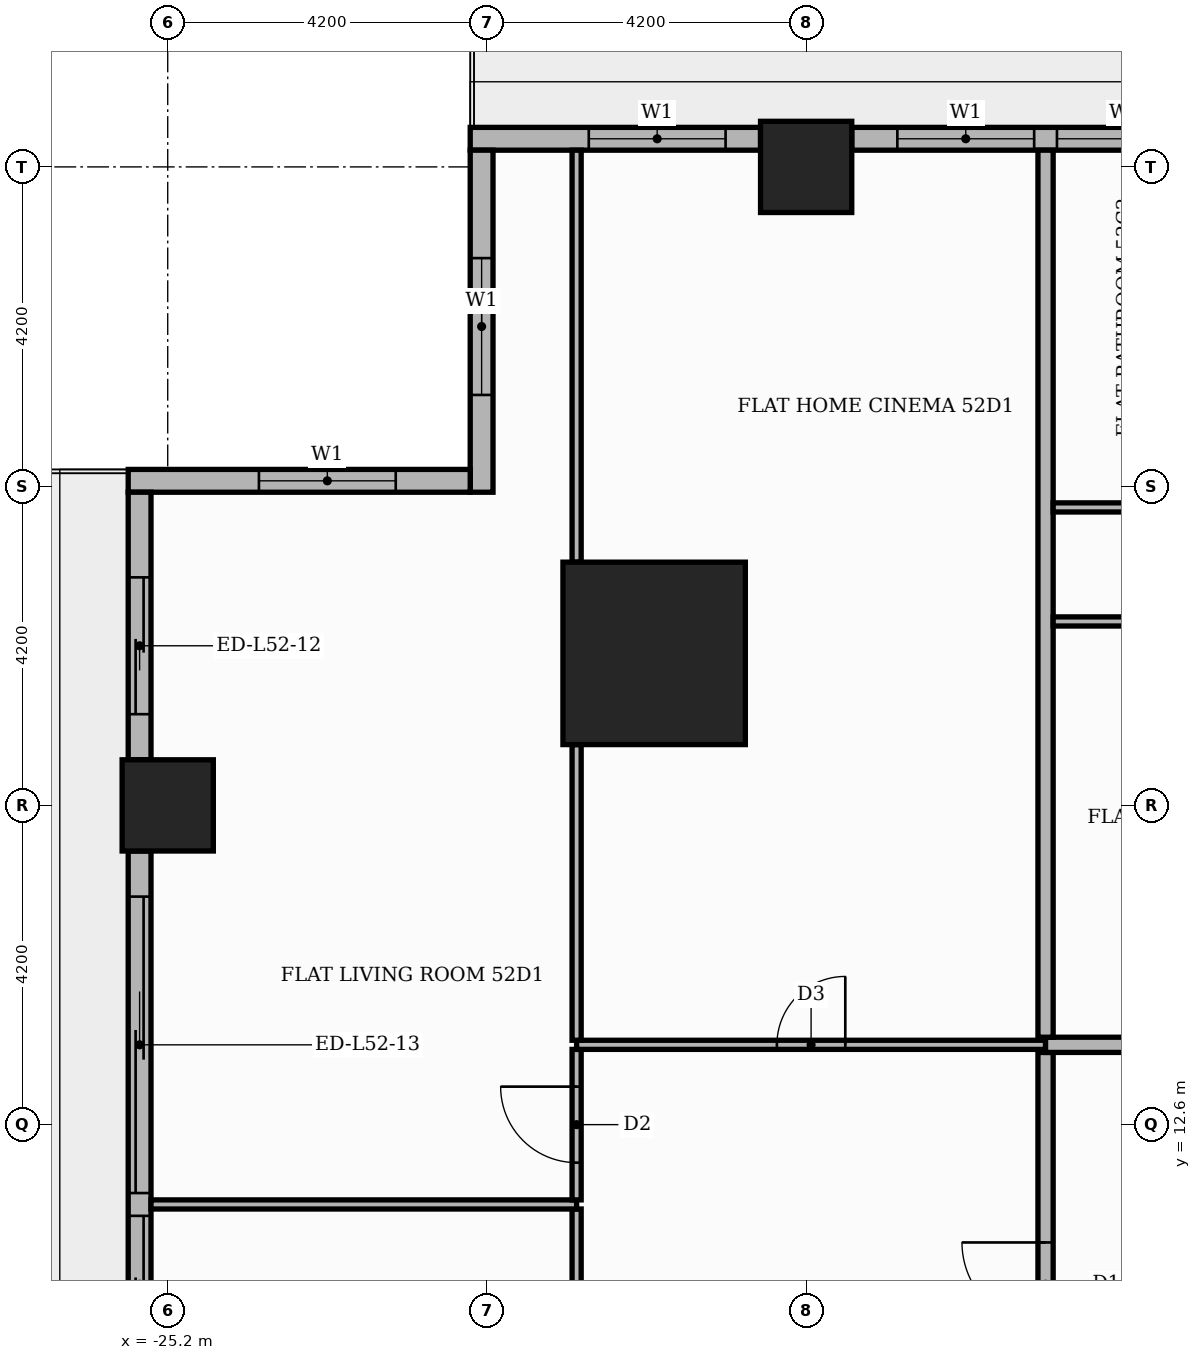
"""IFC4 building model, lengths in metres.
Left out: names, types, materials, properties, quantities, classifications, styles, units other than length and angle.
Written with IfcOpenShell. Run it as: python <this file> out.ifc"""

import sys

from ifc_helpers import new_model, si_unit, direction, frame, frame_2d, origin, origin_2d, place, context, subcontext, project, spatial, rectangle, extrude, element, fill, save


model = new_model("IFC4")
c1 = context("Model", 3, precision=1e-05, world=origin(), true_north=direction((0.0, 1.0)))
c2 = subcontext(c1, "Body", "Model", "MODEL_VIEW")
j1 = project(units=[si_unit("LENGTHUNIT", "METRE"), si_unit("PLANEANGLEUNIT", "RADIAN")], contexts=[c1])
p1 = place(None, origin())
s1 = spatial("IfcSite", under=j1, at=p1, CompositionType="ELEMENT")
p2 = place(p1, origin())
s2 = spatial("IfcBuilding", under=s1, at=p2, CompositionType="ELEMENT")
p3 = place(p2, frame((0.0, 0.0, 219.6)))
s3 = spatial("IfcBuildingStorey", under=s2, at=p3, CompositionType="ELEMENT", Elevation=219.6)
p4 = place(p3, frame((-18.8, 18.8, 0.0), z_axis=(0.0, 0.0, 1.0), x_axis=(1.0, 0.0, 0.0)))
e1 = element("IfcColumn", 1, at=p4, inside=s3, PredefinedType="COLUMN", context=c2, shape_type="SweptSolid", body=[
    extrude(rectangle(XDim=2.4, YDim=2.4, at=origin_2d()), origin(), (0.0, 0.0, 1.0), 3.9),
])
for number, where, z_axis, x_axis in (
    (2, (-16.8, 25.2, 0.0), (0.0, 0.0, 1.0), (1.0, 0.0, 0.0)),
    (3, (-25.2, 16.8, 0.0), (0.0, 0.0, 1.0), (1.0, 0.0, 0.0)),
):
    element("IfcColumn", number, at=place(p3, frame(where, z_axis=z_axis, x_axis=x_axis)), inside=s3, PredefinedType="COLUMN", context=c2, shape_type="SweptSolid", body=[
        extrude(rectangle(XDim=1.2, YDim=1.2, at=origin_2d()), origin(), (0.0, 0.0, 1.0), 3.9),
    ])
p5 = place(p3, frame((-9.0, 25.57, 0.0), z_axis=(0.0, 0.0, 1.0), x_axis=(-1.0, 0.0, 0.0)))
e4 = element("IfcWall", 4, at=p5, inside=s3, PredefinedType="STANDARD", context=c2, shape_type="SweptSolid", body=[
    extrude(rectangle(XDim=7.2, YDim=0.3, at=frame_2d((3.6, 0.0))), origin(), (0.0, 0.0, 1.0), 3.48),
])
p6 = place(p5, frame((0.6, 0.0, 0.9)))
e5 = element("IfcOpeningElement", 5, at=p6, cuts=e4, PredefinedType="OPENING", context=c2, shape_type="SweptSolid", body=[
    extrude(rectangle(XDim=1.8, YDim=2.1, at=frame_2d((0.9, 1.05))), frame((0.0, 0.16, 0.0), z_axis=(0.0, -1.0, 0.0), x_axis=(1.0, 0.0, 0.0)), (0.0, 0.0, 1.0), 0.32),
])
p7 = place(p5, frame((2.7, 0.0, 0.9)))
e6 = element("IfcOpeningElement", 6, at=p7, cuts=e4, PredefinedType="OPENING", context=c2, shape_type="SweptSolid", body=[
    extrude(rectangle(XDim=1.8, YDim=2.1, at=frame_2d((0.9, 1.05))), frame((0.0, 0.16, 0.0), z_axis=(0.0, -1.0, 0.0), x_axis=(1.0, 0.0, 0.0)), (0.0, 0.0, 1.0), 0.32),
])
p8 = place(p5, frame((4.8, 0.0, 0.9)))
e7 = element("IfcOpeningElement", 7, at=p8, cuts=e4, PredefinedType="OPENING", context=c2, shape_type="SweptSolid", body=[
    extrude(rectangle(XDim=1.8, YDim=2.1, at=frame_2d((0.9, 1.05))), frame((0.0, 0.16, 0.0), z_axis=(0.0, -1.0, 0.0), x_axis=(1.0, 0.0, 0.0)), (0.0, 0.0, 1.0), 0.32),
])
p9 = place(p3, frame((-17.4, 25.57, 0.0), z_axis=(0.0, 0.0, 1.0), x_axis=(-1.0, 0.0, 0.0)))
e8 = element("IfcWall", 8, at=p9, inside=s3, PredefinedType="STANDARD", context=c2, shape_type="SweptSolid", body=[
    extrude(rectangle(XDim=3.82, YDim=0.3, at=frame_2d((1.91, 0.0))), origin(), (0.0, 0.0, 1.0), 3.48),
])
p10 = place(p9, frame((0.46, 0.0, 0.9)))
e9 = element("IfcOpeningElement", 9, at=p10, cuts=e8, PredefinedType="OPENING", context=c2, shape_type="SweptSolid", body=[
    extrude(rectangle(XDim=1.8, YDim=2.1, at=frame_2d((0.9, 1.05))), frame((0.0, 0.16, 0.0), z_axis=(0.0, -1.0, 0.0), x_axis=(1.0, 0.0, 0.0)), (0.0, 0.0, 1.0), 0.32),
])
p11 = place(p3, frame((-21.07, 25.42, 0.0), z_axis=(0.0, 0.0, 1.0), x_axis=(0.0, -1.0, 0.0)))
e10 = element("IfcWall", 10, at=p11, inside=s3, PredefinedType="STANDARD", context=c2, shape_type="SweptSolid", body=[
    extrude(rectangle(XDim=4.5, YDim=0.3, at=frame_2d((2.25, 0.0))), origin(), (0.0, 0.0, 1.0), 3.48),
])
p12 = place(p11, frame((1.42, 0.0, 0.9)))
e11 = element("IfcOpeningElement", 11, at=p12, cuts=e10, PredefinedType="OPENING", context=c2, shape_type="SweptSolid", body=[
    extrude(rectangle(XDim=1.8, YDim=2.1, at=frame_2d((0.9, 1.05))), frame((0.0, 0.16, 0.0), z_axis=(0.0, -1.0, 0.0), x_axis=(1.0, 0.0, 0.0)), (0.0, 0.0, 1.0), 0.32),
])
p13 = place(p3, frame((-21.22, 21.07, 0.0), z_axis=(0.0, 0.0, 1.0), x_axis=(-1.0, 0.0, 0.0)))
e12 = element("IfcWall", 12, at=p13, inside=s3, PredefinedType="STANDARD", context=c2, shape_type="SweptSolid", body=[
    extrude(rectangle(XDim=4.5, YDim=0.3, at=frame_2d((2.25, 0.0))), origin(), (0.0, 0.0, 1.0), 3.48),
])
p14 = place(p13, frame((0.98, 0.0, 0.9)))
e13 = element("IfcOpeningElement", 13, at=p14, cuts=e12, PredefinedType="OPENING", context=c2, shape_type="SweptSolid", body=[
    extrude(rectangle(XDim=1.8, YDim=2.1, at=frame_2d((0.9, 1.05))), frame((0.0, 0.16, 0.0), z_axis=(0.0, -1.0, 0.0), x_axis=(1.0, 0.0, 0.0)), (0.0, 0.0, 1.0), 0.32),
])
p15 = place(p3, frame((-25.57, 20.92, 0.0), z_axis=(0.0, 0.0, 1.0), x_axis=(0.0, -1.0, 0.0)))
e14 = element("IfcWall", 14, at=p15, inside=s3, PredefinedType="STANDARD", context=c2, shape_type="SweptSolid", body=[
    extrude(rectangle(XDim=3.52, YDim=0.3, at=frame_2d((1.76, 0.0))), origin(), (0.0, 0.0, 1.0), 3.48),
])
p16 = place(p15, frame((1.12, 0.0, 0.0)))
e15 = element("IfcOpeningElement", 15, at=p16, cuts=e14, PredefinedType="OPENING", context=c2, shape_type="SweptSolid", body=[
    extrude(rectangle(XDim=1.8, YDim=2.4, at=frame_2d((0.9, 1.2))), frame((0.0, 0.16, 0.0), z_axis=(0.0, -1.0, 0.0), x_axis=(1.0, 0.0, 0.0)), (0.0, 0.0, 1.0), 0.32),
])
p17 = place(p3, frame((-25.57, 16.2, 0.0), z_axis=(0.0, 0.0, 1.0), x_axis=(0.0, -1.0, 0.0)))
e16 = element("IfcWall", 16, at=p17, inside=s3, PredefinedType="STANDARD", context=c2, shape_type="SweptSolid", body=[
    extrude(rectangle(XDim=7.2, YDim=0.3, at=frame_2d((3.6, 0.0))), origin(), (0.0, 0.0, 1.0), 3.48),
])
p18 = place(p17, frame((0.6, 0.0, 0.0)))
e17 = element("IfcOpeningElement", 17, at=p18, cuts=e16, PredefinedType="OPENING", context=c2, shape_type="SweptSolid", body=[
    extrude(rectangle(XDim=3.9, YDim=2.4, at=frame_2d((1.95, 1.2))), frame((0.0, 0.16, 0.0), z_axis=(0.0, -1.0, 0.0), x_axis=(1.0, 0.0, 0.0)), (0.0, 0.0, 1.0), 0.32),
])
p19 = place(p17, frame((4.8, 0.0, 0.0)))
e18 = element("IfcOpeningElement", 18, at=p19, cuts=e16, PredefinedType="OPENING", context=c2, shape_type="SweptSolid", body=[
    extrude(rectangle(XDim=1.8, YDim=2.4, at=frame_2d((0.9, 1.2))), frame((0.0, 0.16, 0.0), z_axis=(0.0, -1.0, 0.0), x_axis=(1.0, 0.0, 0.0)), (0.0, 0.0, 1.0), 0.32),
])
p20 = place(p3, frame((-13.65, -13.55, 0.0), z_axis=(0.0, 0.0, 1.0), x_axis=(0.0, 1.0, 0.0)))
e19 = element("IfcWall", 19, at=p20, inside=s3, PredefinedType="PARTITIONING", context=c2, shape_type="SweptSolid", body=[
    extrude(rectangle(XDim=27.1, YDim=0.2, at=frame_2d((13.55, 0.0))), origin(), (0.0, 0.0, 1.0), 3.48),
])
p21 = place(p20, frame((23.5, 0.0, 0.0)))
e20 = element("IfcOpeningElement", 20, at=p21, cuts=e19, PredefinedType="OPENING", context=c2, shape_type="SweptSolid", body=[
    extrude(rectangle(XDim=1.1, YDim=2.4, at=frame_2d((0.55, 1.2))), frame((0.0, 0.11, 0.0), z_axis=(0.0, -1.0, 0.0), x_axis=(1.0, 0.0, 0.0)), (0.0, 0.0, 1.0), 0.22),
])
p22 = place(p3, frame((-19.82, 5.31, 0.0), z_axis=(0.0, 0.0, 1.0), x_axis=(0.0, 1.0, 0.0)))
e21 = element("IfcWall", 21, at=p22, inside=s3, PredefinedType="PARTITIONING", context=c2, shape_type="SweptSolid", body=[
    extrude(rectangle(XDim=6.18, YDim=0.12, at=frame_2d((3.09, 0.0))), origin(), (0.0, 0.0, 1.0), 3.48),
])
p23 = place(p22, frame((2.64, 0.0, 0.0)))
e22 = element("IfcOpeningElement", 22, at=p23, cuts=e21, PredefinedType="OPENING", context=c2, shape_type="SweptSolid", body=[
    extrude(rectangle(XDim=0.9, YDim=2.1, at=frame_2d((0.45, 1.05))), frame((0.0, 0.07, 0.0), z_axis=(0.0, -1.0, 0.0), x_axis=(1.0, 0.0, 0.0)), (0.0, 0.0, 1.0), 0.14),
])
p24 = place(p3, frame((-25.42, 11.55, 0.0), z_axis=(0.0, 0.0, 1.0), x_axis=(1.0, 0.0, 0.0)))
e23 = element("IfcWall", 23, at=p24, inside=s3, PredefinedType="PARTITIONING", context=c2, shape_type="SweptSolid", body=[
    extrude(rectangle(XDim=5.6, YDim=0.12, at=frame_2d((2.8, 0.0))), origin(), (0.0, 0.0, 1.0), 3.48),
])
p25 = place(p3, frame((-19.82, 11.61, 0.0), z_axis=(0.0, 0.0, 1.0), x_axis=(0.0, 1.0, 0.0)))
e24 = element("IfcWall", 24, at=p25, inside=s3, PredefinedType="PARTITIONING", context=c2, shape_type="SweptSolid", body=[
    extrude(rectangle(XDim=1.98, YDim=0.12, at=frame_2d((0.99, 0.0))), origin(), (0.0, 0.0, 1.0), 3.48),
])
p26 = place(p25, frame((0.49, 0.0, 0.0)))
e25 = element("IfcOpeningElement", 25, at=p26, cuts=e24, PredefinedType="OPENING", context=c2, shape_type="SweptSolid", body=[
    extrude(rectangle(XDim=1.0, YDim=2.1, at=frame_2d((0.5, 1.05))), frame((0.0, 0.07, 0.0), z_axis=(0.0, -1.0, 0.0), x_axis=(1.0, 0.0, 0.0)), (0.0, 0.0, 1.0), 0.14),
])
p27 = place(p3, frame((-19.82, 13.65, 0.0), z_axis=(0.0, 0.0, 1.0), x_axis=(1.0, 0.0, 0.0)))
e26 = element("IfcWall", 26, at=p27, inside=s3, PredefinedType="PARTITIONING", context=c2, shape_type="SweptSolid", body=[
    extrude(rectangle(XDim=6.17, YDim=0.12, at=frame_2d((3.085, 0.0))), origin(), (0.0, 0.0, 1.0), 3.48),
])
p28 = place(p27, frame((2.635, 0.0, 0.0)))
e27 = element("IfcOpeningElement", 27, at=p28, cuts=e26, PredefinedType="OPENING", context=c2, shape_type="SweptSolid", body=[
    extrude(rectangle(XDim=0.9, YDim=2.1, at=frame_2d((0.45, 1.05))), frame((0.0, 0.07, 0.0), z_axis=(0.0, -1.0, 0.0), x_axis=(1.0, 0.0, 0.0)), (0.0, 0.0, 1.0), 0.14),
])
p29 = place(p3, frame((-13.65, 13.65, 0.0), z_axis=(0.0, 0.0, 1.0), x_axis=(1.0, 0.0, 0.0)))
e28 = element("IfcWall", 28, at=p29, inside=s3, PredefinedType="PARTITIONING", context=c2, shape_type="SweptSolid", body=[
    extrude(rectangle(XDim=39.07, YDim=0.2, at=frame_2d((19.535, 0.0))), origin(), (0.0, 0.0, 1.0), 3.48),
])
p30 = place(p29, frame((24.65, 0.0, 0.0)))
e29 = element("IfcOpeningElement", 29, at=p30, cuts=e28, PredefinedType="OPENING", context=c2, shape_type="SweptSolid", body=[
    extrude(rectangle(XDim=1.1, YDim=2.4, at=frame_2d((0.55, 1.2))), frame((0.0, 0.11, 0.0), z_axis=(0.0, -1.0, 0.0), x_axis=(1.0, 0.0, 0.0)), (0.0, 0.0, 1.0), 0.22),
])
p31 = place(p29, frame((14.15, 0.0, 0.0)))
e30 = element("IfcOpeningElement", 30, at=p31, cuts=e28, PredefinedType="OPENING", context=c2, shape_type="SweptSolid", body=[
    extrude(rectangle(XDim=1.1, YDim=2.4, at=frame_2d((0.55, 1.2))), frame((0.0, 0.11, 0.0), z_axis=(0.0, -1.0, 0.0), x_axis=(1.0, 0.0, 0.0)), (0.0, 0.0, 1.0), 0.22),
])
p32 = place(p3, frame((-19.82, 13.71, 0.0), z_axis=(0.0, 0.0, 1.0), x_axis=(0.0, 1.0, 0.0)))
e31 = element("IfcWall", 31, at=p32, inside=s3, PredefinedType="PARTITIONING", context=c2, shape_type="SweptSolid", body=[
    extrude(rectangle(XDim=3.89, YDim=0.12, at=frame_2d((1.945, 0.0))), origin(), (0.0, 0.0, 1.0), 3.48),
])
p33 = place(p3, frame((-13.65, 13.75, 0.0), z_axis=(0.0, 0.0, 1.0), x_axis=(0.0, 1.0, 0.0)))
e32 = element("IfcWall", 32, at=p33, inside=s3, PredefinedType="PARTITIONING", context=c2, shape_type="SweptSolid", body=[
    extrude(rectangle(XDim=11.67, YDim=0.2, at=frame_2d((5.835, 0.0))), origin(), (0.0, 0.0, 1.0), 3.48),
])
p34 = place(p3, frame((-13.55, 19.22, 0.0), z_axis=(0.0, 0.0, 1.0), x_axis=(1.0, 0.0, 0.0)))
e33 = element("IfcWall", 33, at=p34, inside=s3, PredefinedType="PARTITIONING", context=c2, shape_type="SweptSolid", body=[
    extrude(rectangle(XDim=12.5, YDim=0.12, at=frame_2d((6.25, 0.0))), origin(), (0.0, 0.0, 1.0), 3.48),
])
p35 = place(p34, frame((8.9, 0.0, 0.0)))
e34 = element("IfcOpeningElement", 34, at=p35, cuts=e33, PredefinedType="OPENING", context=c2, shape_type="SweptSolid", body=[
    extrude(rectangle(XDim=0.9, YDim=2.1, at=frame_2d((0.45, 1.05))), frame((0.0, 0.07, 0.0), z_axis=(0.0, -1.0, 0.0), x_axis=(1.0, 0.0, 0.0)), (0.0, 0.0, 1.0), 0.14),
])
p36 = place(p34, frame((4.55, 0.0, 0.0)))
e35 = element("IfcOpeningElement", 35, at=p36, cuts=e33, PredefinedType="OPENING", context=c2, shape_type="SweptSolid", body=[
    extrude(rectangle(XDim=0.9, YDim=2.1, at=frame_2d((0.45, 1.05))), frame((0.0, 0.07, 0.0), z_axis=(0.0, -1.0, 0.0), x_axis=(1.0, 0.0, 0.0)), (0.0, 0.0, 1.0), 0.14),
])
p37 = place(p34, frame((1.4, 0.0, 0.0)))
e36 = element("IfcOpeningElement", 36, at=p37, cuts=e33, PredefinedType="OPENING", context=c2, shape_type="SweptSolid", body=[
    extrude(rectangle(XDim=0.9, YDim=2.1, at=frame_2d((0.45, 1.05))), frame((0.0, 0.07, 0.0), z_axis=(0.0, -1.0, 0.0), x_axis=(1.0, 0.0, 0.0)), (0.0, 0.0, 1.0), 0.14),
])
p38 = place(p3, frame((-19.82, 20.0, 0.0), z_axis=(0.0, 0.0, 1.0), x_axis=(0.0, 1.0, 0.0)))
e37 = element("IfcWall", 37, at=p38, inside=s3, PredefinedType="PARTITIONING", context=c2, shape_type="SweptSolid", body=[
    extrude(rectangle(XDim=5.42, YDim=0.12, at=frame_2d((2.71, 0.0))), origin(), (0.0, 0.0, 1.0), 3.48),
])
p39 = place(p3, frame((-13.55, 20.72, 0.0), z_axis=(0.0, 0.0, 1.0), x_axis=(1.0, 0.0, 0.0)))
e38 = element("IfcWall", 38, at=p39, inside=s3, PredefinedType="PARTITIONING", context=c2, shape_type="SweptSolid", body=[
    extrude(rectangle(XDim=18.7, YDim=0.12, at=frame_2d((9.35, 0.0))), origin(), (0.0, 0.0, 1.0), 3.48),
])
p40 = place(p39, frame((14.1, 0.0, 0.0)))
e39 = element("IfcOpeningElement", 39, at=p40, cuts=e38, PredefinedType="OPENING", context=c2, shape_type="SweptSolid", body=[
    extrude(rectangle(XDim=1.0, YDim=2.1, at=frame_2d((0.5, 1.05))), frame((0.0, 0.07, 0.0), z_axis=(0.0, -1.0, 0.0), x_axis=(1.0, 0.0, 0.0)), (0.0, 0.0, 1.0), 0.14),
])
p41 = place(p39, frame((6.8, 0.0, 0.0)))
e40 = element("IfcOpeningElement", 40, at=p41, cuts=e38, PredefinedType="OPENING", context=c2, shape_type="SweptSolid", body=[
    extrude(rectangle(XDim=0.9, YDim=2.1, at=frame_2d((0.45, 1.05))), frame((0.0, 0.07, 0.0), z_axis=(0.0, -1.0, 0.0), x_axis=(1.0, 0.0, 0.0)), (0.0, 0.0, 1.0), 0.14),
])
p42 = place(p7, origin())
e41 = element("IfcWindow", 41, at=p42, inside=s3, PartitioningType="SINGLE_PANEL", PredefinedType="WINDOW", context=c2, shape_type="SweptSolid", body=[
    extrude(rectangle(XDim=1.8, YDim=2.1, at=frame_2d((0.9, 1.05))), frame((0.0, 0.03, 0.0), z_axis=(0.0, -1.0, 0.0), x_axis=(1.0, 0.0, 0.0)), (0.0, 0.0, 1.0), 0.06),
])
fill(e6, e41)
p43 = place(p8, origin())
e42 = element("IfcWindow", 42, at=p43, inside=s3, PartitioningType="SINGLE_PANEL", PredefinedType="WINDOW", context=c2, shape_type="SweptSolid", body=[
    extrude(rectangle(XDim=1.8, YDim=2.1, at=frame_2d((0.9, 1.05))), frame((0.0, 0.03, 0.0), z_axis=(0.0, -1.0, 0.0), x_axis=(1.0, 0.0, 0.0)), (0.0, 0.0, 1.0), 0.06),
])
fill(e7, e42)
p44 = place(p10, origin())
e43 = element("IfcWindow", 43, at=p44, inside=s3, PartitioningType="SINGLE_PANEL", PredefinedType="WINDOW", context=c2, shape_type="SweptSolid", body=[
    extrude(rectangle(XDim=1.8, YDim=2.1, at=frame_2d((0.9, 1.05))), frame((0.0, 0.03, 0.0), z_axis=(0.0, -1.0, 0.0), x_axis=(1.0, 0.0, 0.0)), (0.0, 0.0, 1.0), 0.06),
])
fill(e9, e43)
p45 = place(p12, origin())
e44 = element("IfcWindow", 44, at=p45, inside=s3, PartitioningType="SINGLE_PANEL", PredefinedType="WINDOW", context=c2, shape_type="SweptSolid", body=[
    extrude(rectangle(XDim=1.8, YDim=2.1, at=frame_2d((0.9, 1.05))), frame((0.0, 0.03, 0.0), z_axis=(0.0, -1.0, 0.0), x_axis=(1.0, 0.0, 0.0)), (0.0, 0.0, 1.0), 0.06),
])
fill(e11, e44)
p46 = place(p14, origin())
e45 = element("IfcWindow", 45, at=p46, inside=s3, PartitioningType="SINGLE_PANEL", PredefinedType="WINDOW", context=c2, shape_type="SweptSolid", body=[
    extrude(rectangle(XDim=1.8, YDim=2.1, at=frame_2d((0.9, 1.05))), frame((0.0, 0.03, 0.0), z_axis=(0.0, -1.0, 0.0), x_axis=(1.0, 0.0, 0.0)), (0.0, 0.0, 1.0), 0.06),
])
fill(e13, e45)
p47 = place(p16, origin())
e46 = element("IfcDoor", 46, at=p47, inside=s3, OperationType="SLIDING_TO_RIGHT", PredefinedType="DOOR", context=c2, shape_type="SweptSolid", body=[
    extrude(rectangle(XDim=1.8, YDim=2.4, at=frame_2d((0.9, 1.2))), frame((0.0, 0.025, 0.0), z_axis=(0.0, -1.0, 0.0), x_axis=(1.0, 0.0, 0.0)), (0.0, 0.0, 1.0), 0.05),
])
fill(e15, e46)
p48 = place(p18, origin())
e47 = element("IfcDoor", 47, at=p48, inside=s3, OperationType="SLIDING_TO_LEFT", PredefinedType="DOOR", context=c2, shape_type="SweptSolid", body=[
    extrude(rectangle(XDim=3.9, YDim=2.4, at=frame_2d((1.95, 1.2))), frame((0.0, 0.025, 0.0), z_axis=(0.0, -1.0, 0.0), x_axis=(1.0, 0.0, 0.0)), (0.0, 0.0, 1.0), 0.05),
])
fill(e17, e47)
p49 = place(p19, origin())
e48 = element("IfcDoor", 48, at=p49, inside=s3, OperationType="SLIDING_TO_RIGHT", PredefinedType="DOOR", context=c2, shape_type="SweptSolid", body=[
    extrude(rectangle(XDim=1.8, YDim=2.4, at=frame_2d((0.9, 1.2))), frame((0.0, 0.025, 0.0), z_axis=(0.0, -1.0, 0.0), x_axis=(1.0, 0.0, 0.0)), (0.0, 0.0, 1.0), 0.05),
])
fill(e18, e48)
p50 = place(p21, origin())
e49 = element("IfcDoor", 49, at=p50, inside=s3, OperationType="SINGLE_SWING_RIGHT", PredefinedType="DOOR", context=c2, shape_type="SweptSolid", body=[
    extrude(rectangle(XDim=1.1, YDim=2.4, at=frame_2d((0.55, 1.2))), frame((0.0, 0.025, 0.0), z_axis=(0.0, -1.0, 0.0), x_axis=(1.0, 0.0, 0.0)), (0.0, 0.0, 1.0), 0.05),
])
fill(e20, e49)
p51 = place(p28, origin())
e50 = element("IfcDoor", 50, at=p51, inside=s3, OperationType="SINGLE_SWING_RIGHT", PredefinedType="DOOR", context=c2, shape_type="SweptSolid", body=[
    extrude(rectangle(XDim=0.9, YDim=2.1, at=frame_2d((0.45, 1.05))), frame((0.0, 0.025, 0.0), z_axis=(0.0, -1.0, 0.0), x_axis=(1.0, 0.0, 0.0)), (0.0, 0.0, 1.0), 0.05),
])
fill(e27, e50)
p52 = place(p26, origin())
e51 = element("IfcDoor", 51, at=p52, inside=s3, OperationType="SINGLE_SWING_RIGHT", PredefinedType="DOOR", context=c2, shape_type="SweptSolid", body=[
    extrude(rectangle(XDim=1.0, YDim=2.1, at=frame_2d((0.5, 1.05))), frame((0.0, 0.025, 0.0), z_axis=(0.0, -1.0, 0.0), x_axis=(1.0, 0.0, 0.0)), (0.0, 0.0, 1.0), 0.05),
])
fill(e25, e51)
save(model, sys.argv[1])
